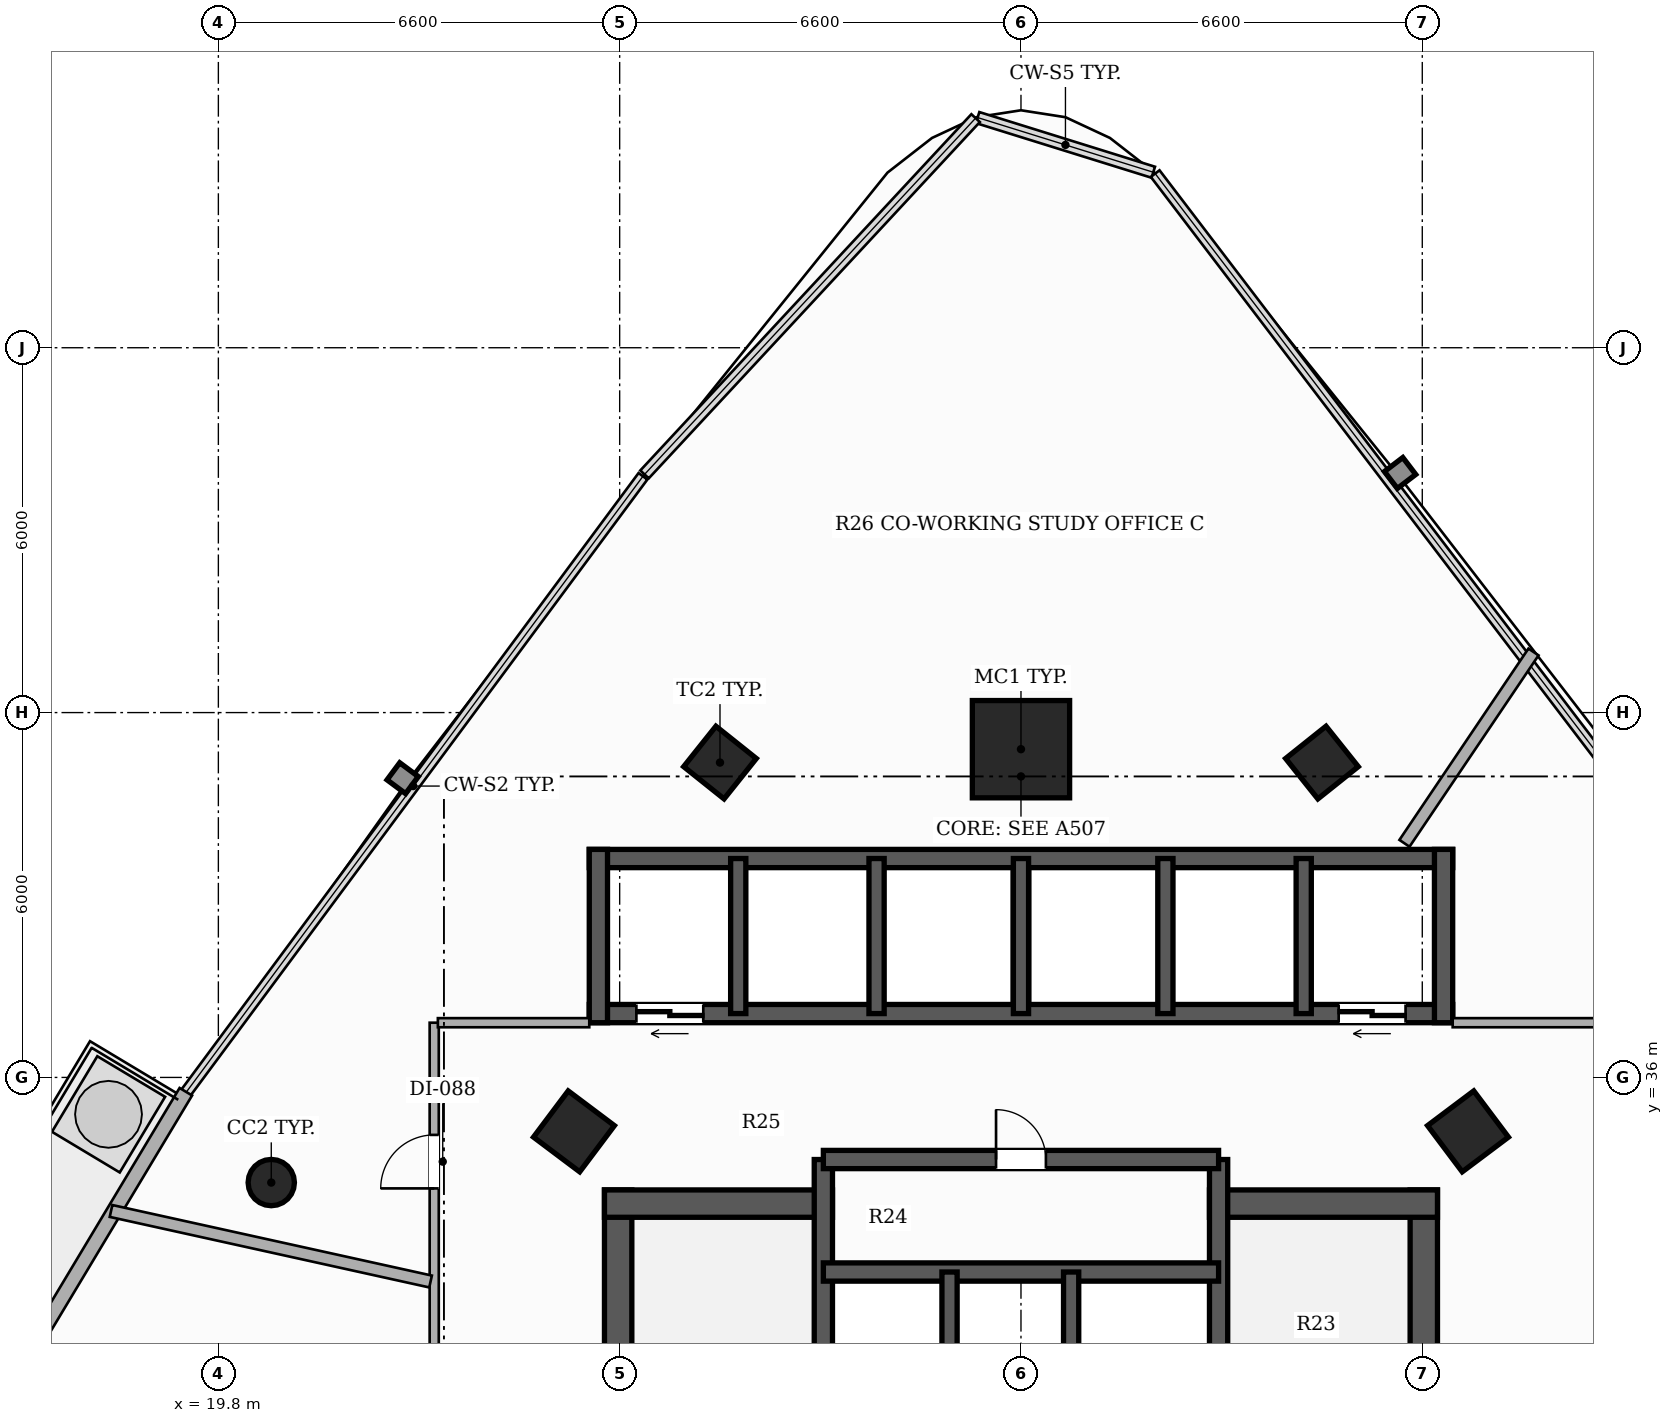
"""IFC4 building model, lengths in metres.
Left out: names, types, materials, properties, quantities, classifications, styles, units other than length and angle.
Written with IfcOpenShell. Run it as: python <this file> out.ifc"""

import sys

from ifc_helpers import new_model, si_unit, direction, frame, frame_2d, origin, origin_2d, place, context, subcontext, project, spatial, rectangle, hollow_rectangle, hollow_circle, extrude, element, fill, save


model = new_model("IFC4")
c1 = context("Model", 3, precision=1e-05, world=origin(), true_north=direction((0.0, 1.0)))
c2 = subcontext(c1, "Body", "Model", "MODEL_VIEW")
j1 = project(units=[si_unit("LENGTHUNIT", "METRE"), si_unit("PLANEANGLEUNIT", "RADIAN")], contexts=[c1])
p1 = place(None, origin())
s1 = spatial("IfcSite", under=j1, at=p1, CompositionType="ELEMENT")
p2 = place(p1, origin())
s2 = spatial("IfcBuilding", under=s1, at=p2, CompositionType="ELEMENT")
p3 = place(p2, frame((0.0, 0.0, 53.3)))
s3 = spatial("IfcBuildingStorey", under=s2, at=p3, CompositionType="ELEMENT", Elevation=53.3)
p4 = place(p3, frame((26.375, 26.45, 0.0), z_axis=(0.0, 0.0, 1.0), x_axis=(0.0, 1.0, 0.0)))
e1 = element("IfcWall", 1, at=p4, inside=s3, PredefinedType="SHEAR", context=c2, shape_type="SweptSolid", body=[
    extrude(rectangle(XDim=7.7, YDim=0.45, at=frame_2d((3.85, 0.0))), origin(), (0.0, 0.0, 1.0), 3.3),
])
p5 = place(p3, frame((26.15, 33.925, 0.0), z_axis=(0.0, 0.0, 1.0), x_axis=(1.0, 0.0, 0.0)))
e2 = element("IfcWall", 2, at=p5, inside=s3, PredefinedType="SHEAR", context=c2, shape_type="SweptSolid", body=[
    extrude(rectangle(XDim=3.75, YDim=0.45, at=frame_2d((1.875, 0.0))), origin(), (0.0, 0.0, 1.0), 3.3),
])
p6 = place(p3, frame((39.625, 26.45, 0.0), z_axis=(0.0, 0.0, 1.0), x_axis=(0.0, 1.0, 0.0)))
e3 = element("IfcWall", 3, at=p6, inside=s3, PredefinedType="SHEAR", context=c2, shape_type="SweptSolid", body=[
    extrude(rectangle(XDim=7.7, YDim=0.45, at=frame_2d((3.85, 0.0))), origin(), (0.0, 0.0, 1.0), 3.3),
])
p7 = place(p3, frame((36.1, 33.925, 0.0), z_axis=(0.0, 0.0, 1.0), x_axis=(1.0, 0.0, 0.0)))
e4 = element("IfcWall", 4, at=p7, inside=s3, PredefinedType="SHEAR", context=c2, shape_type="SweptSolid", body=[
    extrude(rectangle(XDim=3.75, YDim=0.45, at=frame_2d((1.875, 0.0))), origin(), (0.0, 0.0, 1.0), 3.3),
])
p8 = place(p3, frame((29.75, 26.45, 0.0), z_axis=(0.0, 0.0, 1.0), x_axis=(0.0, 1.0, 0.0)))
e5 = element("IfcWall", 5, at=p8, inside=s3, PredefinedType="SHEAR", context=c2, shape_type="SweptSolid", body=[
    extrude(rectangle(XDim=8.2, YDim=0.3, at=frame_2d((4.1, 0.0))), origin(), (0.0, 0.0, 1.0), 3.3),
])
p9 = place(p8, frame((0.6, 0.0, 0.0)))
e6 = element("IfcOpeningElement", 6, at=p9, cuts=e5, PredefinedType="OPENING", context=c2, shape_type="SweptSolid", body=[
    extrude(rectangle(XDim=1.05, YDim=2.15, at=frame_2d((0.525, 1.075))), frame((0.0, 0.16, 0.0), z_axis=(0.0, -1.0, 0.0), x_axis=(1.0, 0.0, 0.0)), (0.0, 0.0, 1.0), 0.32),
])
p10 = place(p3, frame((36.25, 26.45, 0.0), z_axis=(0.0, 0.0, 1.0), x_axis=(0.0, 1.0, 0.0)))
e7 = element("IfcWall", 7, at=p10, inside=s3, PredefinedType="SHEAR", context=c2, shape_type="SweptSolid", body=[
    extrude(rectangle(XDim=8.2, YDim=0.3, at=frame_2d((4.1, 0.0))), origin(), (0.0, 0.0, 1.0), 3.3),
])
p11 = place(p10, frame((0.6, 0.0, 0.0)))
e8 = element("IfcOpeningElement", 8, at=p11, cuts=e7, PredefinedType="OPENING", context=c2, shape_type="SweptSolid", body=[
    extrude(rectangle(XDim=1.05, YDim=2.15, at=frame_2d((0.525, 1.075))), frame((0.0, 0.16, 0.0), z_axis=(0.0, -1.0, 0.0), x_axis=(1.0, 0.0, 0.0)), (0.0, 0.0, 1.0), 0.32),
])
p12 = place(p3, frame((29.75, 32.8, 0.0), z_axis=(0.0, 0.0, 1.0), x_axis=(1.0, 0.0, 0.0)))
e9 = element("IfcWall", 9, at=p12, inside=s3, PredefinedType="SHEAR", context=c2, shape_type="SweptSolid", body=[
    extrude(rectangle(XDim=6.5, YDim=0.3, at=frame_2d((3.25, 0.0))), origin(), (0.0, 0.0, 1.0), 3.3),
])
for number, where, z_axis, x_axis in (
    (10, (31.825, 29.9, 0.0), (0.0, 0.0, 1.0), (0.0, 1.0, 0.0)),
    (11, (33.825, 29.9, 0.0), (0.0, 0.0, 1.0), (0.0, 1.0, 0.0)),
):
    element("IfcWall", number, at=place(p3, frame(where, z_axis=z_axis, x_axis=x_axis)), inside=s3, PredefinedType="SHEAR", context=c2, shape_type="SweptSolid", body=[
        extrude(rectangle(XDim=2.9, YDim=0.25, at=frame_2d((1.45, 0.0))), origin(), (0.0, 0.0, 1.0), 3.3),
    ])
p13 = place(p3, frame((29.75, 34.65, 0.0), z_axis=(0.0, 0.0, 1.0), x_axis=(1.0, 0.0, 0.0)))
e12 = element("IfcWall", 12, at=p13, inside=s3, PredefinedType="SHEAR", context=c2, shape_type="SweptSolid", body=[
    extrude(rectangle(XDim=6.5, YDim=0.3, at=frame_2d((3.25, 0.0))), origin(), (0.0, 0.0, 1.0), 3.3),
])
p14 = place(p13, frame((2.84, 0.0, 0.0)))
e13 = element("IfcOpeningElement", 13, at=p14, cuts=e12, PredefinedType="OPENING", context=c2, shape_type="SweptSolid", body=[
    extrude(rectangle(XDim=0.82, YDim=2.1, at=frame_2d((0.41, 1.05))), frame((0.0, 0.16, 0.0), z_axis=(0.0, -1.0, 0.0), x_axis=(1.0, 0.0, 0.0)), (0.0, 0.0, 1.0), 0.32),
])
p15 = place(p3, frame((40.1, 37.05, 0.0), z_axis=(0.0, 0.0, 1.0), x_axis=(-1.0, 0.0, 0.0)))
e14 = element("IfcWall", 14, at=p15, inside=s3, PredefinedType="SHEAR", context=c2, shape_type="SweptSolid", body=[
    extrude(rectangle(XDim=14.2, YDim=0.3, at=frame_2d((7.1, 0.0))), origin(), (0.0, 0.0, 1.0), 3.3),
])
p16 = place(p15, frame((12.325, 0.0, 0.0)))
e15 = element("IfcOpeningElement", 15, at=p16, cuts=e14, PredefinedType="OPENING", context=c2, shape_type="SweptSolid", body=[
    extrude(rectangle(XDim=1.1, YDim=2.2, at=frame_2d((0.55, 1.1))), frame((0.0, 0.16, 0.0), z_axis=(0.0, -1.0, 0.0), x_axis=(1.0, 0.0, 0.0)), (0.0, 0.0, 1.0), 0.32),
])
p17 = place(p15, frame((0.775, 0.0, 0.0)))
e16 = element("IfcOpeningElement", 16, at=p17, cuts=e14, PredefinedType="OPENING", context=c2, shape_type="SweptSolid", body=[
    extrude(rectangle(XDim=1.1, YDim=2.2, at=frame_2d((0.55, 1.1))), frame((0.0, 0.16, 0.0), z_axis=(0.0, -1.0, 0.0), x_axis=(1.0, 0.0, 0.0)), (0.0, 0.0, 1.0), 0.32),
])
p18 = place(p3, frame((25.9, 39.6, 0.0), z_axis=(0.0, 0.0, 1.0), x_axis=(1.0, 0.0, 0.0)))
e17 = element("IfcWall", 17, at=p18, inside=s3, PredefinedType="SHEAR", context=c2, shape_type="SweptSolid", body=[
    extrude(rectangle(XDim=14.2, YDim=0.3, at=frame_2d((7.1, 0.0))), origin(), (0.0, 0.0, 1.0), 3.3),
])
for number, where, z_axis, x_axis in (
    (18, (26.05, 36.9, 0.0), (0.0, 0.0, 1.0), (0.0, 1.0, 0.0)),
    (19, (39.95, 36.9, 0.0), (0.0, 0.0, 1.0), (0.0, 1.0, 0.0)),
):
    element("IfcWall", number, at=place(p3, frame(where, z_axis=z_axis, x_axis=x_axis)), inside=s3, PredefinedType="SHEAR", context=c2, shape_type="SweptSolid", body=[
        extrude(rectangle(XDim=2.85, YDim=0.3, at=frame_2d((1.425, 0.0))), origin(), (0.0, 0.0, 1.0), 3.3),
    ])
for number, where, z_axis, x_axis in (
    (20, (28.35, 37.05, 0.0), (0.0, 0.0, 1.0), (0.0, 1.0, 0.0)),
    (21, (30.625, 37.05, 0.0), (0.0, 0.0, 1.0), (0.0, 1.0, 0.0)),
    (22, (33.0, 37.05, 0.0), (0.0, 0.0, 1.0), (0.0, 1.0, 0.0)),
    (23, (35.375, 37.05, 0.0), (0.0, 0.0, 1.0), (0.0, 1.0, 0.0)),
    (24, (37.65, 37.05, 0.0), (0.0, 0.0, 1.0), (0.0, 1.0, 0.0)),
):
    element("IfcWall", number, at=place(p3, frame(where, z_axis=z_axis, x_axis=x_axis)), inside=s3, PredefinedType="SHEAR", context=c2, shape_type="SweptSolid", body=[
        extrude(rectangle(XDim=2.55, YDim=0.25, at=frame_2d((1.275, 0.0))), origin(), (0.0, 0.0, 1.0), 3.3),
    ])
p19 = place(p3, frame((33.0, 41.398, 0.0), z_axis=(0.0, 0.0, 1.0), x_axis=(1.0, 0.0, 0.0)))
e25 = element("IfcColumn", 25, at=p19, inside=s3, PredefinedType="COLUMN", context=c2, shape_type="SweptSolid", body=[
    extrude(hollow_rectangle(XDim=1.6, YDim=1.6, WallThickness=0.05, at=origin_2d()), origin(), (0.0, 0.0, 1.0), 3.3),
])
for number, where, z_axis, x_axis in (
    (26, (25.648, 35.113, 0.0), (0.0, 0.0, 1.0), (0.6, 0.8, 0.0)),
    (27, (40.352, 35.113, 0.0), (0.0, 0.0, 1.0), (-0.6, 0.8, 0.0)),
):
    element("IfcColumn", number, at=place(p3, frame(where, z_axis=z_axis, x_axis=x_axis)), inside=s3, PredefinedType="COLUMN", context=c2, shape_type="SweptSolid", body=[
        extrude(hollow_rectangle(XDim=0.95, YDim=0.95, WallThickness=0.032, at=origin_2d()), origin(), (0.0, 0.0, 1.0), 3.3),
    ])
for number, where, z_axis, x_axis in (
    (28, (28.05, 41.178, 0.0), (0.0, 0.0, 1.0), (0.624, 0.782, 0.0)),
    (29, (37.95, 41.178, 0.0), (0.0, 0.0, 1.0), (-0.624, 0.782, 0.0)),
):
    element("IfcColumn", number, at=place(p3, frame(where, z_axis=z_axis, x_axis=x_axis)), inside=s3, PredefinedType="COLUMN", context=c2, shape_type="SweptSolid", body=[
        extrude(hollow_rectangle(XDim=0.85, YDim=0.85, WallThickness=0.028, at=origin_2d()), origin(), (0.0, 0.0, 1.0), 3.3),
    ])
p20 = place(p3, frame((20.67, 34.271, 0.0), z_axis=(0.0, 0.0, 1.0), x_axis=(1.0, 0.0, 0.0)))
e30 = element("IfcColumn", 30, at=p20, inside=s3, PredefinedType="COLUMN", context=c2, shape_type="SweptSolid", body=[
    extrude(hollow_circle(Radius=0.381, WallThickness=0.022, at=origin_2d()), origin(), (0.0, 0.0, 1.0), 3.3),
])
p21 = place(p3, frame((19.265, 35.765, 0.0), z_axis=(0.0, 0.0, 1.0), x_axis=(-0.51430869017, -0.857605137121, 0.0)))
e31 = element("IfcWall", 31, at=p21, inside=s3, PredefinedType="SOLIDWALL", context=c2, shape_type="SweptSolid", body=[
    extrude(rectangle(XDim=12.86, YDim=0.24, at=frame_2d((6.43, 0.0))), origin(), (0.0, 0.0, 1.0), 2.624),
])
p22 = place(p21, frame((10.362, 0.0, 0.0)))
e32 = element("IfcOpeningElement", 32, at=p22, cuts=e31, PredefinedType="OPENING", context=c2, shape_type="SweptSolid", body=[
    extrude(rectangle(XDim=1.8, YDim=2.2, at=frame_2d((0.9, 1.1))), frame((0.0, 0.13, 0.0), z_axis=(0.0, -1.0, 0.0), x_axis=(1.0, 0.0, 0.0)), (0.0, 0.0, 1.0), 0.26),
])
p23 = place(p3, frame((40.1, 36.9, 0.0), z_axis=(0.0, 0.0, 1.0), x_axis=(1.0, 0.0, 0.0)))
e33 = element("IfcWall", 33, at=p23, inside=s3, PredefinedType="PARTITIONING", context=c2, shape_type="SweptSolid", body=[
    extrude(rectangle(XDim=2.55, YDim=0.15, at=frame_2d((1.275, 0.0))), origin(), (0.0, 0.0, 1.0), 2.413),
])
p24 = place(p3, frame((23.35, 11.86, 0.0), z_axis=(0.0, 0.0, 1.0), x_axis=(0.0, 1.0, 0.0)))
e34 = element("IfcWall", 34, at=p24, inside=s3, PredefinedType="PARTITIONING", context=c2, shape_type="SweptSolid", body=[
    extrude(rectangle(XDim=25.04, YDim=0.15, at=frame_2d((12.52, 0.0))), origin(), (0.0, 0.0, 1.0), 2.413),
])
p25 = place(p24, frame((15.434, 0.0, 0.0)))
e35 = element("IfcOpeningElement", 35, at=p25, cuts=e34, PredefinedType="OPENING", context=c2, shape_type="SweptSolid", body=[
    extrude(rectangle(XDim=0.88, YDim=2.1, at=frame_2d((0.44, 1.05))), frame((0.0, 0.085, 0.0), z_axis=(0.0, -1.0, 0.0), x_axis=(1.0, 0.0, 0.0)), (0.0, 0.0, 1.0), 0.17),
])
p26 = place(p24, frame((22.315, 0.0, 0.0)))
e36 = element("IfcOpeningElement", 36, at=p26, cuts=e34, PredefinedType="OPENING", context=c2, shape_type="SweptSolid", body=[
    extrude(rectangle(XDim=0.88, YDim=2.1, at=frame_2d((0.44, 1.05))), frame((0.0, 0.085, 0.0), z_axis=(0.0, -1.0, 0.0), x_axis=(1.0, 0.0, 0.0)), (0.0, 0.0, 1.0), 0.17),
])
p27 = place(p24, frame((8.21, 0.0, 0.0)))
e37 = element("IfcOpeningElement", 37, at=p27, cuts=e34, PredefinedType="OPENING", context=c2, shape_type="SweptSolid", body=[
    extrude(rectangle(XDim=0.92, YDim=2.15, at=frame_2d((0.46, 1.075))), frame((0.0, 0.085, 0.0), z_axis=(0.0, -1.0, 0.0), x_axis=(1.0, 0.0, 0.0)), (0.0, 0.0, 1.0), 0.17),
])
p28 = place(p24, frame((2.912, 0.0, 0.0)))
e38 = element("IfcOpeningElement", 38, at=p28, cuts=e34, PredefinedType="OPENING", context=c2, shape_type="SweptSolid", body=[
    extrude(rectangle(XDim=0.92, YDim=2.15, at=frame_2d((0.46, 1.075))), frame((0.0, 0.085, 0.0), z_axis=(0.0, -1.0, 0.0), x_axis=(1.0, 0.0, 0.0)), (0.0, 0.0, 1.0), 0.17),
])
p29 = place(p3, frame((23.41, 36.9, 0.0), z_axis=(0.0, 0.0, 1.0), x_axis=(1.0, 0.0, 0.0)))
e39 = element("IfcWall", 39, at=p29, inside=s3, PredefinedType="PARTITIONING", context=c2, shape_type="SweptSolid", body=[
    extrude(rectangle(XDim=2.49, YDim=0.15, at=frame_2d((1.245, 0.0))), origin(), (0.0, 0.0, 1.0), 2.413),
])
p30 = place(p3, frame((18.035, 33.804, 0.0), z_axis=(0.0, 0.0, 1.0), x_axis=(0.976496681047, -0.215532438172, 0.0)))
e40 = element("IfcWall", 40, at=p30, inside=s3, PredefinedType="PARTITIONING", context=c2, shape_type="SweptSolid", body=[
    extrude(rectangle(XDim=5.382, YDim=0.2, at=frame_2d((2.691, 0.0))), origin(), (0.0, 0.0, 1.0), 2.413),
])
p31 = place(p3, frame((41.429, 42.997, 0.0), z_axis=(0.0, 0.0, 1.0), x_axis=(-0.559086144532, -0.829109572368, 0.0)))
e41 = element("IfcWall", 41, at=p31, inside=s3, PredefinedType="PARTITIONING", context=c2, shape_type="SweptSolid", body=[
    extrude(rectangle(XDim=3.796, YDim=0.2, at=frame_2d((1.898, 0.0))), origin(), (0.0, 0.0, 1.0), 3.06),
])
p32 = place(p16, origin())
e42 = element("IfcDoor", 42, at=p32, inside=s3, OperationType="DOUBLE_DOOR_SLIDING", PredefinedType="DOOR", context=c2, shape_type="SweptSolid", body=[
    extrude(rectangle(XDim=1.1, YDim=2.2, at=frame_2d((0.55, 1.1))), frame((0.0, 0.025, 0.0), z_axis=(0.0, -1.0, 0.0), x_axis=(1.0, 0.0, 0.0)), (0.0, 0.0, 1.0), 0.05),
])
fill(e15, e42)
p33 = place(p17, origin())
e43 = element("IfcDoor", 43, at=p33, inside=s3, OperationType="DOUBLE_DOOR_SLIDING", PredefinedType="DOOR", context=c2, shape_type="SweptSolid", body=[
    extrude(rectangle(XDim=1.1, YDim=2.2, at=frame_2d((0.55, 1.1))), frame((0.0, 0.025, 0.0), z_axis=(0.0, -1.0, 0.0), x_axis=(1.0, 0.0, 0.0)), (0.0, 0.0, 1.0), 0.05),
])
fill(e16, e43)
p34 = place(p14, origin())
e44 = element("IfcDoor", 44, at=p34, inside=s3, OperationType="SINGLE_SWING_LEFT", PredefinedType="DOOR", context=c2, shape_type="SweptSolid", body=[
    extrude(rectangle(XDim=0.82, YDim=2.1, at=frame_2d((0.41, 1.05))), frame((0.0, 0.025, 0.0), z_axis=(0.0, -1.0, 0.0), x_axis=(1.0, 0.0, 0.0)), (0.0, 0.0, 1.0), 0.05),
])
fill(e13, e44)
p35 = place(p26, origin())
e45 = element("IfcDoor", 45, at=p35, inside=s3, OperationType="SINGLE_SWING_LEFT", PredefinedType="DOOR", context=c2, shape_type="SweptSolid", body=[
    extrude(rectangle(XDim=0.88, YDim=2.1, at=frame_2d((0.44, 1.05))), frame((0.0, 0.025, 0.0), z_axis=(0.0, -1.0, 0.0), x_axis=(1.0, 0.0, 0.0)), (0.0, 0.0, 1.0), 0.05),
])
fill(e36, e45)
save(model, sys.argv[1])
